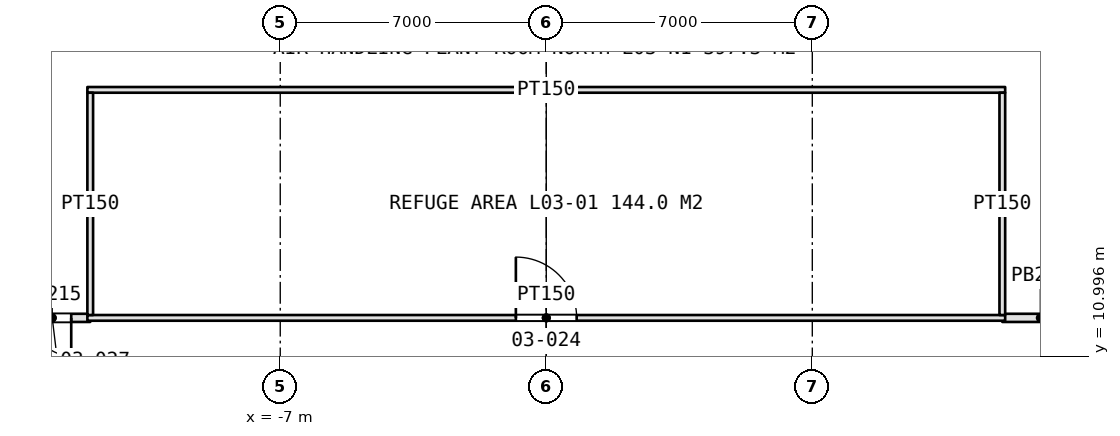
"""IFC4 building model, lengths in metres.
Left out: names, types, materials, properties, quantities, classifications, styles, units other than length and angle.
Written with IfcOpenShell. Run it as: python <this file> out.ifc"""

import sys

from ifc_helpers import new_model, si_unit, direction, frame, frame_2d, origin, place, context, subcontext, project, spatial, rectangle, extrude, element, fill, save


model = new_model("IFC4")
c1 = context("Model", 3, precision=1e-05, world=origin(), true_north=direction((0.0, 1.0)))
c2 = subcontext(c1, "Body", "Model", "MODEL_VIEW")
j1 = project(units=[si_unit("LENGTHUNIT", "METRE"), si_unit("PLANEANGLEUNIT", "RADIAN")], contexts=[c1])
p1 = place(None, origin())
s1 = spatial("IfcSite", under=j1, at=p1, CompositionType="ELEMENT")
p2 = place(p1, origin())
s2 = spatial("IfcBuilding", under=s1, at=p2, CompositionType="ELEMENT")
p3 = place(p2, frame((0.0, 0.0, 15.0)))
s3 = spatial("IfcBuildingStorey", under=s2, at=p3, CompositionType="ELEMENT", Elevation=15.0)
p4 = place(p3, frame((-12.0, 12.0, 0.0), z_axis=(0.0, 0.0, 1.0), x_axis=(-1.0, 0.0, 0.0)))
e1 = element("IfcWall", 1, at=p4, inside=s3, PredefinedType="PARTITIONING", context=c2, shape_type="SweptSolid", body=[
    extrude(rectangle(XDim=2.0, YDim=0.215, at=frame_2d((1.0, 0.0))), origin(), (0.0, 0.0, 1.0), 4.2),
])
p5 = place(p4, frame((0.5, 0.0, 0.0)))
e2 = element("IfcOpeningElement", 2, at=p5, cuts=e1, PredefinedType="OPENING", context=c2, shape_type="SweptSolid", body=[
    extrude(rectangle(XDim=1.0, YDim=2.2, at=frame_2d((0.5, 1.1))), frame((0.0, 0.118, 0.0), z_axis=(0.0, -1.0, 0.0), x_axis=(1.0, 0.0, 0.0)), (0.0, 0.0, 1.0), 0.235),
])
p6 = place(p3, frame((14.0, 12.0, 0.0), z_axis=(0.0, 0.0, 1.0), x_axis=(-1.0, 0.0, 0.0)))
e3 = element("IfcWall", 3, at=p6, inside=s3, PredefinedType="PARTITIONING", context=c2, shape_type="SweptSolid", body=[
    extrude(rectangle(XDim=2.0, YDim=0.215, at=frame_2d((1.0, 0.0))), origin(), (0.0, 0.0, 1.0), 4.2),
])
p7 = place(p3, frame((-12.075, 12.0, 0.0), z_axis=(0.0, 0.0, 1.0), x_axis=(1.0, 0.0, 0.0)))
e4 = element("IfcWall", 4, at=p7, inside=s3, PredefinedType="PARTITIONING", context=c2, shape_type="SweptSolid", body=[
    extrude(rectangle(XDim=24.15, YDim=0.15, at=frame_2d((12.075, 0.0))), origin(), (0.0, 0.0, 1.0), 4.2),
])
p8 = place(p7, frame((11.275, 0.0, 0.0)))
e5 = element("IfcOpeningElement", 5, at=p8, cuts=e4, PredefinedType="OPENING", context=c2, shape_type="SweptSolid", body=[
    extrude(rectangle(XDim=1.6, YDim=2.4, at=frame_2d((0.8, 1.2))), frame((0.0, 0.085, 0.0), z_axis=(0.0, -1.0, 0.0), x_axis=(1.0, 0.0, 0.0)), (0.0, 0.0, 1.0), 0.17),
])
p9 = place(p3, frame((-12.075, 18.0, 0.0), z_axis=(0.0, 0.0, 1.0), x_axis=(1.0, 0.0, 0.0)))
e6 = element("IfcWall", 6, at=p9, inside=s3, PredefinedType="PARTITIONING", context=c2, shape_type="SweptSolid", body=[
    extrude(rectangle(XDim=24.15, YDim=0.15, at=frame_2d((12.075, 0.0))), origin(), (0.0, 0.0, 1.0), 4.2),
])
for number, where, z_axis, x_axis in (
    (7, (-12.0, 12.075, 0.0), (0.0, 0.0, 1.0), (0.0, 1.0, 0.0)),
    (8, (12.0, 12.075, 0.0), (0.0, 0.0, 1.0), (0.0, 1.0, 0.0)),
):
    element("IfcWall", number, at=place(p3, frame(where, z_axis=z_axis, x_axis=x_axis)), inside=s3, PredefinedType="PARTITIONING", context=c2, shape_type="SweptSolid", body=[
        extrude(rectangle(XDim=5.85, YDim=0.15, at=frame_2d((2.925, 0.0))), origin(), (0.0, 0.0, 1.0), 4.2),
    ])
p10 = place(p8, origin())
e9 = element("IfcDoor", 9, at=p10, inside=s3, OperationType="DOUBLE_DOOR_SINGLE_SWING", PredefinedType="DOOR", context=c2, shape_type="SweptSolid", body=[
    extrude(rectangle(XDim=1.6, YDim=2.4, at=frame_2d((0.8, 1.2))), frame((0.0, 0.025, 0.0), z_axis=(0.0, -1.0, 0.0), x_axis=(1.0, 0.0, 0.0)), (0.0, 0.0, 1.0), 0.05),
])
fill(e5, e9)
p11 = place(p5, origin())
e10 = element("IfcDoor", 10, at=p11, inside=s3, OperationType="SINGLE_SWING_LEFT", PredefinedType="DOOR", context=c2, shape_type="SweptSolid", body=[
    extrude(rectangle(XDim=1.0, YDim=2.2, at=frame_2d((0.5, 1.1))), frame((0.0, 0.025, 0.0), z_axis=(0.0, -1.0, 0.0), x_axis=(1.0, 0.0, 0.0)), (0.0, 0.0, 1.0), 0.05),
])
fill(e2, e10)
save(model, sys.argv[1])
